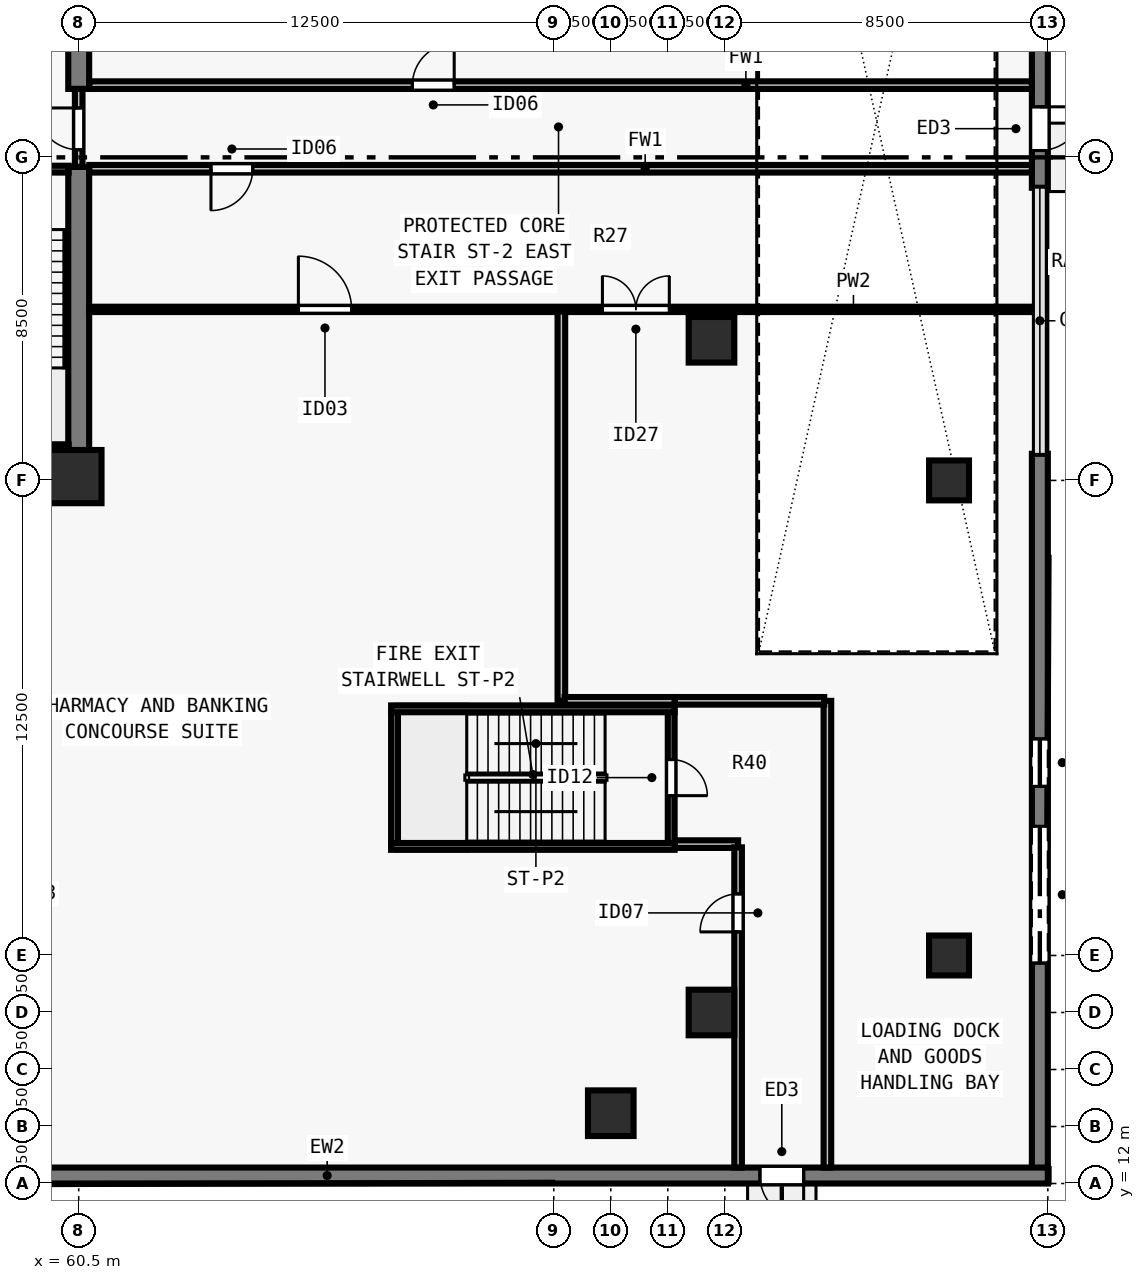
"""IFC4 building model, lengths in metres.
Left out: names, types, materials, properties, quantities, classifications, styles, units other than length and angle.
Written with IfcOpenShell. Run it as: python <this file> out.ifc"""

import sys

from ifc_helpers import new_model, si_unit, direction, frame, frame_2d, origin, origin_2d, place, context, subcontext, project, spatial, rectangle, extrude, element, fill, save


model = new_model("IFC4")
c1 = context("Model", 3, precision=1e-05, world=origin(), true_north=direction((0.0, 1.0)))
c2 = subcontext(c1, "Body", "Model", "MODEL_VIEW")
j1 = project(units=[si_unit("LENGTHUNIT", "METRE"), si_unit("PLANEANGLEUNIT", "RADIAN")], contexts=[c1])
p1 = place(None, origin())
s1 = spatial("IfcSite", under=j1, at=p1, CompositionType="ELEMENT")
p2 = place(p1, origin())
s2 = spatial("IfcBuilding", under=s1, at=p2, CompositionType="ELEMENT")
p3 = place(p2, origin())
s3 = spatial("IfcBuildingStorey", under=s2, at=p3, CompositionType="ELEMENT", Elevation=0.0)
p4 = place(p3, frame((60.4, 30.6, 0.0), z_axis=(0.0, 0.0, 1.0), x_axis=(1.0, 0.0, 0.0)))
e1 = element("IfcColumn", 1, at=p4, inside=s3, PredefinedType="COLUMN", context=c2, shape_type="SweptSolid", body=[
    extrude(rectangle(XDim=1.4, YDim=1.4, at=origin_2d()), origin(), (0.0, 0.0, 1.0), 5.0),
])
for number, where, z_axis, x_axis in (
    (2, (74.5, 13.85, 0.0), (0.0, 0.0, 1.0), (1.0, 0.0, 0.0)),
    (3, (77.15, 16.5, 0.0), (0.0, 0.0, 1.0), (1.0, 0.0, 0.0)),
    (4, (77.15, 34.2, 0.0), (0.0, 0.0, 1.0), (1.0, 0.0, 0.0)),
):
    element("IfcColumn", number, at=place(p3, frame(where, z_axis=z_axis, x_axis=x_axis)), inside=s3, PredefinedType="COLUMN", context=c2, shape_type="SweptSolid", body=[
        extrude(rectangle(XDim=1.2, YDim=1.2, at=origin_2d()), origin(), (0.0, 0.0, 1.0), 5.0),
    ])
for number, where, z_axis, x_axis in (
    (5, (83.4, 18.0, 0.0), (0.0, 0.0, 1.0), (1.0, 0.0, 0.0)),
    (6, (83.4, 30.5, 0.0), (0.0, 0.0, 1.0), (1.0, 0.0, 0.0)),
):
    element("IfcColumn", number, at=place(p3, frame(where, z_axis=z_axis, x_axis=x_axis)), inside=s3, PredefinedType="COLUMN", context=c2, shape_type="SweptSolid", body=[
        extrude(rectangle(XDim=1.05, YDim=1.05, at=origin_2d()), origin(), (0.0, 0.0, 1.0), 5.0),
    ])
p5 = place(p3, frame((85.79, 54.51, 0.0), z_axis=(0.0, 0.0, 1.0), x_axis=(0.0, -1.0, 0.0)))
e7 = element("IfcWall", 7, at=p5, inside=s3, PredefinedType="SOLIDWALL", context=c2, shape_type="SweptSolid", body=[
    extrude(rectangle(XDim=16.31, YDim=0.42, at=frame_2d((8.155, 0.0))), origin(), (0.0, 0.0, 1.0), 4.7),
])
p6 = place(p5, frame((14.18, 0.0, 0.0)))
e8 = element("IfcOpeningElement", 8, at=p6, cuts=e7, PredefinedType="OPENING", context=c2, shape_type="SweptSolid", body=[
    extrude(rectangle(XDim=1.15, YDim=2.15, at=frame_2d((0.575, 1.075))), frame((0.0, 0.22, 0.0), z_axis=(0.0, -1.0, 0.0), x_axis=(1.0, 0.0, 0.0)), (0.0, 0.0, 1.0), 0.44),
])
p7 = place(p3, frame((85.79, 31.2, 0.0), z_axis=(0.0, 0.0, 1.0), x_axis=(0.0, -1.0, 0.0)))
e9 = element("IfcWall", 9, at=p7, inside=s3, PredefinedType="SOLIDWALL", context=c2, shape_type="SweptSolid", body=[
    extrude(rectangle(XDim=18.795, YDim=0.42, at=frame_2d((9.397, 0.0))), origin(), (0.0, 0.0, 1.0), 4.7),
])
p8 = place(p7, frame((9.8, 0.0, 0.0)))
e10 = element("IfcOpeningElement", 10, at=p8, cuts=e9, PredefinedType="OPENING", context=c2, shape_type="SweptSolid", body=[
    extrude(rectangle(XDim=3.6, YDim=3.2, at=frame_2d((1.8, 1.6))), frame((0.0, 0.22, 0.0), z_axis=(0.0, -1.0, 0.0), x_axis=(1.0, 0.0, 0.0)), (0.0, 0.0, 1.0), 0.44),
])
p9 = place(p7, frame((7.5, 0.0, 0.0)))
e11 = element("IfcOpeningElement", 11, at=p9, cuts=e9, PredefinedType="OPENING", context=c2, shape_type="SweptSolid", body=[
    extrude(rectangle(XDim=1.25, YDim=2.15, at=frame_2d((0.625, 1.075))), frame((0.0, 0.22, 0.0), z_axis=(0.0, -1.0, 0.0), x_axis=(1.0, 0.0, 0.0)), (0.0, 0.0, 1.0), 0.44),
])
p10 = place(p3, frame((86.0, 12.21, 0.0), z_axis=(0.0, 0.0, 1.0), x_axis=(-1.0, 0.0, 0.0)))
e12 = element("IfcWall", 12, at=p10, inside=s3, PredefinedType="SOLIDWALL", context=c2, shape_type="SweptSolid", body=[
    extrude(rectangle(XDim=30.2, YDim=0.42, at=frame_2d((15.1, 0.0))), origin(), (0.0, 0.0, 1.0), 4.7),
])
p11 = place(p10, frame((6.425, 0.0, 0.0)))
e13 = element("IfcOpeningElement", 13, at=p11, cuts=e12, PredefinedType="OPENING", context=c2, shape_type="SweptSolid", body=[
    extrude(rectangle(XDim=1.15, YDim=2.15, at=frame_2d((0.575, 1.075))), frame((0.0, 0.22, 0.0), z_axis=(0.0, -1.0, 0.0), x_axis=(1.0, 0.0, 0.0)), (0.0, 0.0, 1.0), 0.44),
])
p12 = place(p3, frame((43.225, 30.5, 0.0), z_axis=(0.0, 0.0, 1.0), x_axis=(1.0, 0.0, 0.0)))
e14 = element("IfcWall", 14, at=p12, inside=s3, PredefinedType="SHEAR", context=c2, shape_type="SweptSolid", body=[
    extrude(rectangle(XDim=17.55, YDim=0.55, at=frame_2d((8.775, 0.0))), origin(), (0.0, 0.0, 1.0), 4.7),
])
p13 = place(p3, frame((60.5, 30.765, 0.0), z_axis=(0.0, 0.0, 1.0), x_axis=(0.0, 1.0, 0.0)))
e15 = element("IfcWall", 15, at=p13, inside=s3, PredefinedType="SHEAR", context=c2, shape_type="SweptSolid", body=[
    extrude(rectangle(XDim=7.985, YDim=0.55, at=frame_2d((3.993, 0.0))), origin(), (0.0, 0.0, 1.0), 4.7),
])
p14 = place(p3, frame((60.5, 40.8, 0.0), z_axis=(0.0, 0.0, 1.0), x_axis=(0.0, 1.0, 0.0)))
e16 = element("IfcWall", 16, at=p14, inside=s3, PredefinedType="SHEAR", context=c2, shape_type="SweptSolid", body=[
    extrude(rectangle(XDim=6.435, YDim=0.55, at=frame_2d((3.218, 0.0))), origin(), (0.0, 0.0, 1.0), 4.7),
])
p15 = place(p3, frame((60.5, 38.75, 0.0), z_axis=(0.0, 0.0, 1.0), x_axis=(0.0, 1.0, 0.0)))
e17 = element("IfcWall", 17, at=p15, inside=s3, PredefinedType="SOLIDWALL", context=c2, shape_type="SweptSolid", body=[
    extrude(rectangle(XDim=2.05, YDim=0.2, at=frame_2d((1.025, 0.0))), origin(), (0.0, 0.0, 1.0), 4.7),
])
p16 = place(p15, frame((0.45, 0.0, 0.0)))
e18 = element("IfcOpeningElement", 18, at=p16, cuts=e17, PredefinedType="OPENING", context=c2, shape_type="SweptSolid", body=[
    extrude(rectangle(XDim=1.1, YDim=2.15, at=frame_2d((0.55, 1.075))), frame((0.0, 0.11, 0.0), z_axis=(0.0, -1.0, 0.0), x_axis=(1.0, 0.0, 0.0)), (0.0, 0.0, 1.0), 0.22),
])
p17 = place(p3, frame((85.58, 38.7, 0.0), z_axis=(0.0, 0.0, 1.0), x_axis=(-1.0, 0.0, 0.0)))
e19 = element("IfcWall", 19, at=p17, inside=s3, PredefinedType="SOLIDWALL", context=c2, shape_type="SweptSolid", body=[
    extrude(rectangle(XDim=24.8, YDim=0.2, at=frame_2d((12.4, 0.0))), origin(), (0.0, 0.0, 1.0), 4.7),
])
p18 = place(p17, frame((20.5, 0.0, 0.0)))
e20 = element("IfcOpeningElement", 20, at=p18, cuts=e19, PredefinedType="OPENING", context=c2, shape_type="SweptSolid", body=[
    extrude(rectangle(XDim=1.1, YDim=2.15, at=frame_2d((0.55, 1.075))), frame((0.0, 0.11, 0.0), z_axis=(0.0, -1.0, 0.0), x_axis=(1.0, 0.0, 0.0)), (0.0, 0.0, 1.0), 0.22),
])
p19 = place(p3, frame((60.78, 40.9, 0.0), z_axis=(0.0, 0.0, 1.0), x_axis=(1.0, 0.0, 0.0)))
e21 = element("IfcWall", 21, at=p19, inside=s3, PredefinedType="SOLIDWALL", context=c2, shape_type="SweptSolid", body=[
    extrude(rectangle(XDim=24.8, YDim=0.2, at=frame_2d((12.4, 0.0))), origin(), (0.0, 0.0, 1.0), 4.7),
])
p20 = place(p19, frame((8.5, 0.0, 0.0)))
e22 = element("IfcOpeningElement", 22, at=p20, cuts=e21, PredefinedType="OPENING", context=c2, shape_type="SweptSolid", body=[
    extrude(rectangle(XDim=1.1, YDim=2.15, at=frame_2d((0.55, 1.075))), frame((0.0, 0.11, 0.0), z_axis=(0.0, -1.0, 0.0), x_axis=(1.0, 0.0, 0.0)), (0.0, 0.0, 1.0), 0.22),
])
p21 = place(p3, frame((60.78, 35.0, 0.0), z_axis=(0.0, 0.0, 1.0), x_axis=(1.0, 0.0, 0.0)))
e23 = element("IfcWall", 23, at=p21, inside=s3, PredefinedType="PARTITIONING", context=c2, shape_type="SweptSolid", body=[
    extrude(rectangle(XDim=24.8, YDim=0.14, at=frame_2d((12.4, 0.0))), origin(), (0.0, 0.0, 1.0), 4.7),
])
p22 = place(p21, frame((5.5, 0.0, 0.0)))
e24 = element("IfcOpeningElement", 24, at=p22, cuts=e23, PredefinedType="OPENING", context=c2, shape_type="SweptSolid", body=[
    extrude(rectangle(XDim=1.4, YDim=2.2, at=frame_2d((0.7, 1.1))), frame((0.0, 0.08, 0.0), z_axis=(0.0, -1.0, 0.0), x_axis=(1.0, 0.0, 0.0)), (0.0, 0.0, 1.0), 0.16),
])
p23 = place(p21, frame((13.5, 0.0, 0.0)))
e25 = element("IfcOpeningElement", 25, at=p23, cuts=e23, PredefinedType="OPENING", context=c2, shape_type="SweptSolid", body=[
    extrude(rectangle(XDim=1.76, YDim=2.2, at=frame_2d((0.88, 1.1))), frame((0.0, 0.08, 0.0), z_axis=(0.0, -1.0, 0.0), x_axis=(1.0, 0.0, 0.0)), (0.0, 0.0, 1.0), 0.16),
])
p24 = place(p3, frame((76.18, 20.93, 0.0), z_axis=(0.0, 0.0, 1.0), x_axis=(1.0, 0.0, 0.0)))
e26 = element("IfcWall", 26, at=p24, inside=s3, PredefinedType="SOLIDWALL", context=c2, shape_type="SweptSolid", body=[
    extrude(rectangle(XDim=1.67, YDim=0.2, at=frame_2d((0.835, 0.0))), origin(), (0.0, 0.0, 1.0), 4.7),
])
p25 = place(p3, frame((77.85, 12.42, 0.0), z_axis=(0.0, 0.0, 1.0), x_axis=(0.0, 1.0, 0.0)))
e27 = element("IfcWall", 27, at=p25, inside=s3, PredefinedType="SOLIDWALL", context=c2, shape_type="SweptSolid", body=[
    extrude(rectangle(XDim=8.425, YDim=0.2, at=frame_2d((4.212, 0.0))), origin(), (0.0, 0.0, 1.0), 4.7),
])
p26 = place(p25, frame((6.2, 0.0, 0.0)))
e28 = element("IfcOpeningElement", 28, at=p26, cuts=e27, PredefinedType="OPENING", context=c2, shape_type="SweptSolid", body=[
    extrude(rectangle(XDim=1.0, YDim=2.15, at=frame_2d((0.5, 1.075))), frame((0.0, 0.11, 0.0), z_axis=(0.0, -1.0, 0.0), x_axis=(1.0, 0.0, 0.0)), (0.0, 0.0, 1.0), 0.22),
])
p27 = place(p3, frame((80.2, 12.42, 0.0), z_axis=(0.0, 0.0, 1.0), x_axis=(0.0, 1.0, 0.0)))
e29 = element("IfcWall", 29, at=p27, inside=s3, PredefinedType="SOLIDWALL", context=c2, shape_type="SweptSolid", body=[
    extrude(rectangle(XDim=12.28, YDim=0.2, at=frame_2d((6.14, 0.0))), origin(), (0.0, 0.0, 1.0), 4.7),
])
p28 = place(p3, frame((76.18, 24.7, 0.0), z_axis=(0.0, 0.0, 1.0), x_axis=(1.0, 0.0, 0.0)))
e30 = element("IfcWall", 30, at=p28, inside=s3, PredefinedType="SOLIDWALL", context=c2, shape_type="SweptSolid", body=[
    extrude(rectangle(XDim=3.935, YDim=0.2, at=frame_2d((1.968, 0.0))), origin(), (0.0, 0.0, 1.0), 4.7),
])
p29 = place(p3, frame((73.2, 24.7, 0.0), z_axis=(0.0, 0.0, 1.0), x_axis=(0.0, 1.0, 0.0)))
e31 = element("IfcWall", 31, at=p29, inside=s3, PredefinedType="SOLIDWALL", context=c2, shape_type="SweptSolid", body=[
    extrude(rectangle(XDim=10.245, YDim=0.2, at=frame_2d((5.123, 0.0))), origin(), (0.0, 0.0, 1.0), 4.7),
])
p30 = place(p3, frame((73.285, 24.7, 0.0), z_axis=(0.0, 0.0, 1.0), x_axis=(1.0, 0.0, 0.0)))
e32 = element("IfcWall", 32, at=p30, inside=s3, PredefinedType="SOLIDWALL", context=c2, shape_type="SweptSolid", body=[
    extrude(rectangle(XDim=2.895, YDim=0.2, at=frame_2d((1.448, 0.0))), origin(), (0.0, 0.0, 1.0), 4.7),
])
p31 = place(p3, frame((57.005, 38.69, 0.0), z_axis=(0.0, 0.0, 1.0), x_axis=(1.0, 0.0, 0.0)))
e33 = element("IfcWall", 33, at=p31, inside=s3, PredefinedType="SOLIDWALL", context=c2, shape_type="SweptSolid", body=[
    extrude(rectangle(XDim=3.23, YDim=0.18, at=frame_2d((1.615, 0.0))), origin(), (0.0, 0.0, 1.0), 4.7),
])
p32 = place(p31, frame((1.14, 0.0, 0.0)))
e34 = element("IfcOpeningElement", 34, at=p32, cuts=e33, PredefinedType="OPENING", context=c2, shape_type="SweptSolid", body=[
    extrude(rectangle(XDim=0.95, YDim=2.15, at=frame_2d((0.475, 1.075))), frame((0.0, 0.1, 0.0), z_axis=(0.0, -1.0, 0.0), x_axis=(1.0, 0.0, 0.0)), (0.0, 0.0, 1.0), 0.2),
])
p33 = place(p3, frame((57.005, 31.36, 0.0), z_axis=(0.0, 0.0, 1.0), x_axis=(1.0, 0.0, 0.0)))
e35 = element("IfcWall", 35, at=p33, inside=s3, PredefinedType="SOLIDWALL", context=c2, shape_type="SweptSolid", body=[
    extrude(rectangle(XDim=3.23, YDim=0.18, at=frame_2d((1.615, 0.0))), origin(), (0.0, 0.0, 1.0), 4.7),
])
p34 = place(p3, frame((76.09, 24.415, 0.0), z_axis=(0.0, 0.0, 1.0), x_axis=(0.0, -1.0, 0.0)))
e36 = element("IfcWall", 36, at=p34, inside=s3, PredefinedType="SOLIDWALL", context=c2, shape_type="SweptSolid", body=[
    extrude(rectangle(XDim=3.47, YDim=0.18, at=frame_2d((1.735, 0.0))), origin(), (0.0, 0.0, 1.0), 4.7),
])
p35 = place(p34, frame((1.26, 0.0, 0.0)))
e37 = element("IfcOpeningElement", 37, at=p35, cuts=e36, PredefinedType="OPENING", context=c2, shape_type="SweptSolid", body=[
    extrude(rectangle(XDim=0.95, YDim=2.15, at=frame_2d((0.475, 1.075))), frame((0.0, 0.1, 0.0), z_axis=(0.0, -1.0, 0.0), x_axis=(1.0, 0.0, 0.0)), (0.0, 0.0, 1.0), 0.2),
])
p36 = place(p3, frame((68.81, 24.415, 0.0), z_axis=(0.0, 0.0, 1.0), x_axis=(0.0, -1.0, 0.0)))
e38 = element("IfcWall", 38, at=p36, inside=s3, PredefinedType="SOLIDWALL", context=c2, shape_type="SweptSolid", body=[
    extrude(rectangle(XDim=3.47, YDim=0.18, at=frame_2d((1.735, 0.0))), origin(), (0.0, 0.0, 1.0), 4.7),
])
for number, where, z_axis, x_axis in (
    (39, (76.18, 24.49, 0.0), (0.0, 0.0, 1.0), (-1.0, 0.0, 0.0)),
    (40, (76.18, 20.87, 0.0), (0.0, 0.0, 1.0), (-1.0, 0.0, 0.0)),
):
    element("IfcWall", number, at=place(p3, frame(where, z_axis=z_axis, x_axis=x_axis)), inside=s3, PredefinedType="SOLIDWALL", context=c2, shape_type="SweptSolid", body=[
        extrude(rectangle(XDim=7.46, YDim=0.18, at=frame_2d((3.73, 0.0))), origin(), (0.0, 0.0, 1.0), 4.7),
    ])
p37 = place(p6, origin())
e41 = element("IfcDoor", 41, at=p37, inside=s3, OperationType="SINGLE_SWING_LEFT", PredefinedType="DOOR", context=c2, shape_type="SweptSolid", body=[
    extrude(rectangle(XDim=1.15, YDim=2.15, at=frame_2d((0.575, 1.075))), frame((0.0, 0.025, 0.0), z_axis=(0.0, -1.0, 0.0), x_axis=(1.0, 0.0, 0.0)), (0.0, 0.0, 1.0), 0.05),
])
fill(e8, e41)
p38 = place(p8, origin())
e42 = element("IfcDoor", 42, at=p38, inside=s3, OperationType="ROLLINGUP", PredefinedType="GATE", context=c2, shape_type="SweptSolid", body=[
    extrude(rectangle(XDim=3.6, YDim=3.2, at=frame_2d((1.8, 1.6))), frame((0.0, 0.025, 0.0), z_axis=(0.0, -1.0, 0.0), x_axis=(1.0, 0.0, 0.0)), (0.0, 0.0, 1.0), 0.05),
])
fill(e10, e42)
p39 = place(p9, origin())
e43 = element("IfcDoor", 43, at=p39, inside=s3, OperationType="SINGLE_SWING_RIGHT", PredefinedType="GATE", context=c2, shape_type="SweptSolid", body=[
    extrude(rectangle(XDim=1.25, YDim=2.15, at=frame_2d((0.625, 1.075))), frame((0.0, 0.025, 0.0), z_axis=(0.0, -1.0, 0.0), x_axis=(1.0, 0.0, 0.0)), (0.0, 0.0, 1.0), 0.05),
])
fill(e11, e43)
p40 = place(p11, origin())
e44 = element("IfcDoor", 44, at=p40, inside=s3, OperationType="SINGLE_SWING_LEFT", PredefinedType="DOOR", context=c2, shape_type="SweptSolid", body=[
    extrude(rectangle(XDim=1.15, YDim=2.15, at=frame_2d((0.575, 1.075))), frame((0.0, 0.025, 0.0), z_axis=(0.0, -1.0, 0.0), x_axis=(1.0, 0.0, 0.0)), (0.0, 0.0, 1.0), 0.05),
])
fill(e13, e44)
p41 = place(p16, origin())
e45 = element("IfcDoor", 45, at=p41, inside=s3, OperationType="SINGLE_SWING_RIGHT", PredefinedType="DOOR", context=c2, shape_type="SweptSolid", body=[
    extrude(rectangle(XDim=1.1, YDim=2.15, at=frame_2d((0.55, 1.075))), frame((0.0, 0.025, 0.0), z_axis=(0.0, -1.0, 0.0), x_axis=(1.0, 0.0, 0.0)), (0.0, 0.0, 1.0), 0.05),
])
fill(e18, e45)
p42 = place(p18, origin())
e46 = element("IfcDoor", 46, at=p42, inside=s3, OperationType="SINGLE_SWING_RIGHT", PredefinedType="DOOR", context=c2, shape_type="SweptSolid", body=[
    extrude(rectangle(XDim=1.1, YDim=2.15, at=frame_2d((0.55, 1.075))), frame((0.0, 0.025, 0.0), z_axis=(0.0, -1.0, 0.0), x_axis=(1.0, 0.0, 0.0)), (0.0, 0.0, 1.0), 0.05),
])
fill(e20, e46)
p43 = place(p20, origin())
e47 = element("IfcDoor", 47, at=p43, inside=s3, OperationType="SINGLE_SWING_RIGHT", PredefinedType="DOOR", context=c2, shape_type="SweptSolid", body=[
    extrude(rectangle(XDim=1.1, YDim=2.15, at=frame_2d((0.55, 1.075))), frame((0.0, 0.025, 0.0), z_axis=(0.0, -1.0, 0.0), x_axis=(1.0, 0.0, 0.0)), (0.0, 0.0, 1.0), 0.05),
])
fill(e22, e47)
p44 = place(p26, origin())
e48 = element("IfcDoor", 48, at=p44, inside=s3, OperationType="SINGLE_SWING_LEFT", PredefinedType="DOOR", context=c2, shape_type="SweptSolid", body=[
    extrude(rectangle(XDim=1.0, YDim=2.15, at=frame_2d((0.5, 1.075))), frame((0.0, 0.025, 0.0), z_axis=(0.0, -1.0, 0.0), x_axis=(1.0, 0.0, 0.0)), (0.0, 0.0, 1.0), 0.05),
])
fill(e28, e48)
p45 = place(p22, origin())
e49 = element("IfcDoor", 49, at=p45, inside=s3, OperationType="SINGLE_SWING_LEFT", PredefinedType="DOOR", context=c2, shape_type="SweptSolid", body=[
    extrude(rectangle(XDim=1.4, YDim=2.2, at=frame_2d((0.7, 1.1))), frame((0.0, 0.025, 0.0), z_axis=(0.0, -1.0, 0.0), x_axis=(1.0, 0.0, 0.0)), (0.0, 0.0, 1.0), 0.05),
])
fill(e24, e49)
p46 = place(p23, origin())
e50 = element("IfcDoor", 50, at=p46, inside=s3, OperationType="DOUBLE_DOOR_SINGLE_SWING", PredefinedType="DOOR", context=c2, shape_type="SweptSolid", body=[
    extrude(rectangle(XDim=1.76, YDim=2.2, at=frame_2d((0.88, 1.1))), frame((0.0, 0.025, 0.0), z_axis=(0.0, -1.0, 0.0), x_axis=(1.0, 0.0, 0.0)), (0.0, 0.0, 1.0), 0.05),
])
fill(e25, e50)
p47 = place(p35, origin())
e51 = element("IfcDoor", 51, at=p47, inside=s3, OperationType="SINGLE_SWING_RIGHT", PredefinedType="DOOR", context=c2, shape_type="SweptSolid", body=[
    extrude(rectangle(XDim=0.95, YDim=2.15, at=frame_2d((0.475, 1.075))), frame((0.0, 0.025, 0.0), z_axis=(0.0, -1.0, 0.0), x_axis=(1.0, 0.0, 0.0)), (0.0, 0.0, 1.0), 0.05),
])
fill(e37, e51)
save(model, sys.argv[1])
